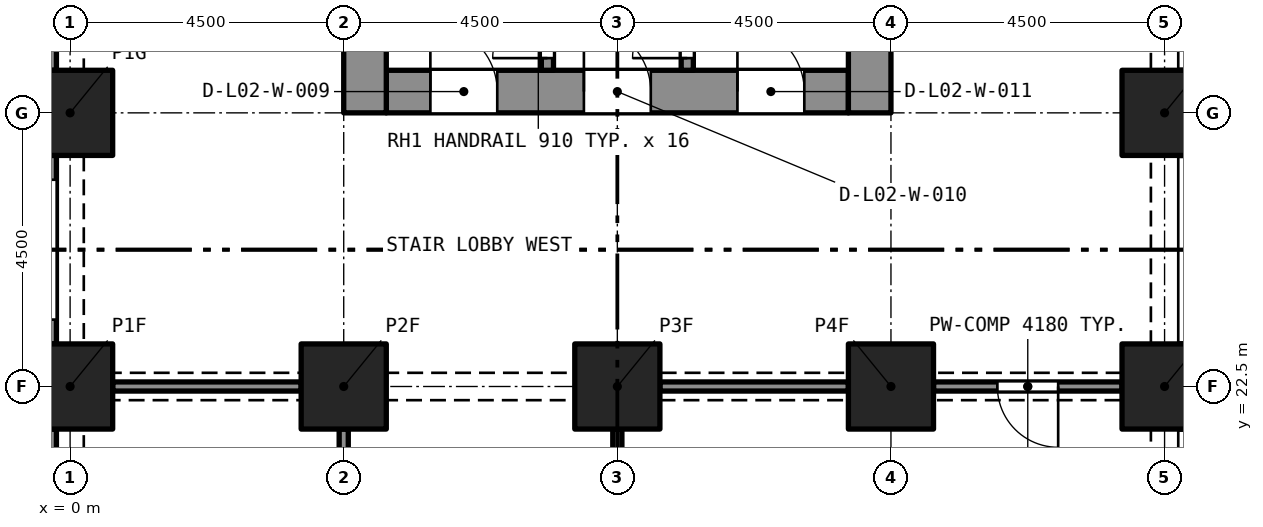
"""IFC4 building model, lengths in metres.
Left out: names, types, materials, properties, quantities, classifications, styles, units other than length and angle.
Written with IfcOpenShell. Run it as: python <this file> out.ifc"""

import sys

from ifc_helpers import new_model, si_unit, direction, frame, frame_2d, origin, origin_2d, place, context, subcontext, project, spatial, rectangle, extrude, element, fill, save


model = new_model("IFC4")
c1 = context("Model", 3, precision=1e-05, world=origin(), true_north=direction((0.0, 1.0)))
c2 = subcontext(c1, "Body", "Model", "MODEL_VIEW")
j1 = project(units=[si_unit("LENGTHUNIT", "METRE"), si_unit("PLANEANGLEUNIT", "RADIAN")], contexts=[c1])
p1 = place(None, origin())
s1 = spatial("IfcSite", under=j1, at=p1, CompositionType="ELEMENT")
p2 = place(p1, origin())
s2 = spatial("IfcBuilding", under=s1, at=p2, CompositionType="ELEMENT")
p3 = place(p2, frame((0.0, 0.0, 11.0)))
s3 = spatial("IfcBuildingStorey", under=s2, at=p3, CompositionType="ELEMENT", Elevation=11.0)
for number, where, z_axis, x_axis in (
    (1, (0.0, 22.5, 0.0), (0.0, 0.0, 1.0), (1.0, 0.0, 0.0)),
    (2, (4.5, 22.5, 0.0), (0.0, 0.0, 1.0), (1.0, 0.0, 0.0)),
    (3, (9.0, 22.5, 0.0), (0.0, 0.0, 1.0), (1.0, 0.0, 0.0)),
    (4, (13.5, 22.5, 0.0), (0.0, 0.0, 1.0), (1.0, 0.0, 0.0)),
    (5, (18.0, 22.5, 0.0), (0.0, 0.0, 1.0), (1.0, 0.0, 0.0)),
    (6, (0.0, 27.0, 0.0), (0.0, 0.0, 1.0), (1.0, 0.0, 0.0)),
    (7, (18.0, 27.0, 0.0), (0.0, 0.0, 1.0), (1.0, 0.0, 0.0)),
):
    element("IfcColumn", number, at=place(p3, frame(where, z_axis=z_axis, x_axis=x_axis)), inside=s3, PredefinedType="COLUMN", context=c2, shape_type="SweptSolid", body=[
        extrude(rectangle(XDim=1.4, YDim=1.4, at=origin_2d()), origin(), (0.0, 0.0, 1.0), 5.0),
    ])
p4 = place(p3, frame((5.2, 27.35, 0.0), z_axis=(0.0, 0.0, 1.0), x_axis=(1.0, 0.0, 0.0)))
e8 = element("IfcWall", 8, at=p4, inside=s3, PredefinedType="SOLIDWALL", context=c2, shape_type="SweptSolid", body=[
    extrude(rectangle(XDim=7.6, YDim=0.7, at=frame_2d((3.8, 0.0))), origin(), (0.0, 0.0, 1.0), 5.0),
])
p5 = place(p4, frame((0.725, 0.0, 0.0)))
e9 = element("IfcOpeningElement", 9, at=p5, cuts=e8, PredefinedType="OPENING", context=c2, shape_type="SweptSolid", body=[
    extrude(rectangle(XDim=1.1, YDim=2.1, at=frame_2d((0.55, 1.05))), frame((0.0, 0.36, 0.0), z_axis=(0.0, -1.0, 0.0), x_axis=(1.0, 0.0, 0.0)), (0.0, 0.0, 1.0), 0.72),
])
p6 = place(p4, frame((3.25, 0.0, 0.0)))
e10 = element("IfcOpeningElement", 10, at=p6, cuts=e8, PredefinedType="OPENING", context=c2, shape_type="SweptSolid", body=[
    extrude(rectangle(XDim=1.1, YDim=2.1, at=frame_2d((0.55, 1.05))), frame((0.0, 0.36, 0.0), z_axis=(0.0, -1.0, 0.0), x_axis=(1.0, 0.0, 0.0)), (0.0, 0.0, 1.0), 0.72),
])
p7 = place(p4, frame((5.775, 0.0, 0.0)))
e11 = element("IfcOpeningElement", 11, at=p7, cuts=e8, PredefinedType="OPENING", context=c2, shape_type="SweptSolid", body=[
    extrude(rectangle(XDim=1.1, YDim=2.1, at=frame_2d((0.55, 1.05))), frame((0.0, 0.36, 0.0), z_axis=(0.0, -1.0, 0.0), x_axis=(1.0, 0.0, 0.0)), (0.0, 0.0, 1.0), 0.72),
])
p8 = place(p3, frame((4.85, 27.0, 0.0), z_axis=(0.0, 0.0, 1.0), x_axis=(0.0, 1.0, 0.0)))
e12 = element("IfcWall", 12, at=p8, inside=s3, PredefinedType="SOLIDWALL", context=c2, shape_type="SweptSolid", body=[
    extrude(rectangle(XDim=13.5, YDim=0.7, at=frame_2d((6.75, 0.0))), origin(), (0.0, 0.0, 1.0), 5.0),
])
p9 = place(p8, frame((8.95, 0.0, 0.0)))
e13 = element("IfcOpeningElement", 13, at=p9, cuts=e12, PredefinedType="OPENING", context=c2, shape_type="SweptSolid", body=[
    extrude(rectangle(XDim=1.2, YDim=2.1, at=frame_2d((0.6, 1.05))), frame((0.0, 0.36, 0.0), z_axis=(0.0, -1.0, 0.0), x_axis=(1.0, 0.0, 0.0)), (0.0, 0.0, 1.0), 0.72),
])
p10 = place(p3, frame((13.15, 27.0, 0.0), z_axis=(0.0, 0.0, 1.0), x_axis=(0.0, 1.0, 0.0)))
e14 = element("IfcWall", 14, at=p10, inside=s3, PredefinedType="SOLIDWALL", context=c2, shape_type="SweptSolid", body=[
    extrude(rectangle(XDim=13.5, YDim=0.7, at=frame_2d((6.75, 0.0))), origin(), (0.0, 0.0, 1.0), 5.0),
])
p11 = place(p10, frame((11.1, 0.0, 0.0)))
e15 = element("IfcOpeningElement", 15, at=p11, cuts=e14, PredefinedType="OPENING", context=c2, shape_type="SweptSolid", body=[
    extrude(rectangle(XDim=1.1, YDim=2.1, at=frame_2d((0.55, 1.05))), frame((0.0, 0.36, 0.0), z_axis=(0.0, -1.0, 0.0), x_axis=(1.0, 0.0, 0.0)), (0.0, 0.0, 1.0), 0.72),
])
p12 = place(p10, frame((8.95, 0.0, 0.0)))
e16 = element("IfcOpeningElement", 16, at=p12, cuts=e14, PredefinedType="OPENING", context=c2, shape_type="SweptSolid", body=[
    extrude(rectangle(XDim=1.2, YDim=2.1, at=frame_2d((0.6, 1.05))), frame((0.0, 0.36, 0.0), z_axis=(0.0, -1.0, 0.0), x_axis=(1.0, 0.0, 0.0)), (0.0, 0.0, 1.0), 0.72),
])
p13 = place(p3, frame((-0.375, 27.7, 0.0), z_axis=(0.0, 0.0, 1.0), x_axis=(0.0, 1.0, 0.0)))
e17 = element("IfcWall", 17, at=p13, inside=s3, PredefinedType="SOLIDWALL", context=c2, shape_type="SweptSolid", body=[
    extrude(rectangle(XDim=3.1, YDim=0.3, at=frame_2d((1.55, 0.0))), origin(), (0.0, 0.0, 1.0), 5.0),
])
p14 = place(p13, frame((0.4, 0.0, 0.45)))
e18 = element("IfcOpeningElement", 18, at=p14, cuts=e17, PredefinedType="OPENING", context=c2, shape_type="SweptSolid", body=[
    extrude(rectangle(XDim=2.3, YDim=3.3, at=frame_2d((1.15, 1.65))), frame((0.0, 0.16, 0.0), z_axis=(0.0, -1.0, 0.0), x_axis=(1.0, 0.0, 0.0)), (0.0, 0.0, 1.0), 0.32),
])
p15 = place(p3, frame((-0.375, 23.2, 0.0), z_axis=(0.0, 0.0, 1.0), x_axis=(0.0, 1.0, 0.0)))
e19 = element("IfcWall", 19, at=p15, inside=s3, PredefinedType="SOLIDWALL", context=c2, shape_type="SweptSolid", body=[
    extrude(rectangle(XDim=3.1, YDim=0.3, at=frame_2d((1.55, 0.0))), origin(), (0.0, 0.0, 1.0), 5.0),
])
p16 = place(p15, frame((0.4, 0.0, 0.45)))
e20 = element("IfcOpeningElement", 20, at=p16, cuts=e19, PredefinedType="OPENING", context=c2, shape_type="SweptSolid", body=[
    extrude(rectangle(XDim=2.3, YDim=3.3, at=frame_2d((1.15, 1.65))), frame((0.0, 0.16, 0.0), z_axis=(0.0, -1.0, 0.0), x_axis=(1.0, 0.0, 0.0)), (0.0, 0.0, 1.0), 0.32),
])
p17 = place(p3, frame((-0.375, 18.7, 0.0), z_axis=(0.0, 0.0, 1.0), x_axis=(0.0, 1.0, 0.0)))
e21 = element("IfcWall", 21, at=p17, inside=s3, PredefinedType="SOLIDWALL", context=c2, shape_type="SweptSolid", body=[
    extrude(rectangle(XDim=3.1, YDim=0.3, at=frame_2d((1.55, 0.0))), origin(), (0.0, 0.0, 1.0), 5.0),
])
p18 = place(p17, frame((0.4, 0.0, 0.45)))
e22 = element("IfcOpeningElement", 22, at=p18, cuts=e21, PredefinedType="OPENING", context=c2, shape_type="SweptSolid", body=[
    extrude(rectangle(XDim=2.3, YDim=3.3, at=frame_2d((1.15, 1.65))), frame((0.0, 0.16, 0.0), z_axis=(0.0, -1.0, 0.0), x_axis=(1.0, 0.0, 0.0)), (0.0, 0.0, 1.0), 0.32),
])
p19 = place(p3, frame((7.85, 27.7, 0.0), z_axis=(0.0, 0.0, 1.0), x_axis=(0.0, 1.0, 0.0)))
e23 = element("IfcWall", 23, at=p19, inside=s3, PredefinedType="SOLIDWALL", context=c2, shape_type="SweptSolid", body=[
    extrude(rectangle(XDim=5.4, YDim=0.2, at=frame_2d((2.7, 0.0))), origin(), (0.0, 0.0, 1.0), 4.65),
])
p20 = place(p19, frame((0.2, 0.0, 0.0)))
e24 = element("IfcOpeningElement", 24, at=p20, cuts=e23, PredefinedType="OPENING", context=c2, shape_type="SweptSolid", body=[
    extrude(rectangle(XDim=0.9, YDim=2.1, at=frame_2d((0.45, 1.05))), frame((0.0, 0.11, 0.0), z_axis=(0.0, -1.0, 0.0), x_axis=(1.0, 0.0, 0.0)), (0.0, 0.0, 1.0), 0.22),
])
p21 = place(p3, frame((10.15, 27.7, 0.0), z_axis=(0.0, 0.0, 1.0), x_axis=(0.0, 1.0, 0.0)))
e25 = element("IfcWall", 25, at=p21, inside=s3, PredefinedType="SOLIDWALL", context=c2, shape_type="SweptSolid", body=[
    extrude(rectangle(XDim=5.4, YDim=0.2, at=frame_2d((2.7, 0.0))), origin(), (0.0, 0.0, 1.0), 4.65),
])
p22 = place(p21, frame((0.2, 0.0, 0.0)))
e26 = element("IfcOpeningElement", 26, at=p22, cuts=e25, PredefinedType="OPENING", context=c2, shape_type="SweptSolid", body=[
    extrude(rectangle(XDim=0.9, YDim=2.1, at=frame_2d((0.45, 1.05))), frame((0.0, 0.11, 0.0), z_axis=(0.0, -1.0, 0.0), x_axis=(1.0, 0.0, 0.0)), (0.0, 0.0, 1.0), 0.22),
])
p23 = place(p3, frame((17.3, 22.5, 0.0), z_axis=(0.0, 0.0, 1.0), x_axis=(-1.0, 0.0, 0.0)))
e27 = element("IfcWall", 27, at=p23, inside=s3, PredefinedType="PARTITIONING", context=c2, shape_type="SweptSolid", body=[
    extrude(rectangle(XDim=3.1, YDim=0.15, at=frame_2d((1.55, 0.0))), origin(), (0.0, 0.0, 1.0), 4.18),
])
p24 = place(p23, frame((1.05, 0.0, 0.0)))
e28 = element("IfcOpeningElement", 28, at=p24, cuts=e27, PredefinedType="OPENING", context=c2, shape_type="SweptSolid", body=[
    extrude(rectangle(XDim=1.0, YDim=2.1, at=frame_2d((0.5, 1.05))), frame((0.0, 0.085, 0.0), z_axis=(0.0, -1.0, 0.0), x_axis=(1.0, 0.0, 0.0)), (0.0, 0.0, 1.0), 0.17),
])
for number, where, z_axis, x_axis in (
    (29, (9.7, 22.5, 0.0), (0.0, 0.0, 1.0), (1.0, 0.0, 0.0)),
    (30, (0.7, 22.5, 0.0), (0.0, 0.0, 1.0), (1.0, 0.0, 0.0)),
):
    element("IfcWall", number, at=place(p3, frame(where, z_axis=z_axis, x_axis=x_axis)), inside=s3, PredefinedType="PARTITIONING", context=c2, shape_type="SweptSolid", body=[
        extrude(rectangle(XDim=3.1, YDim=0.15, at=frame_2d((1.55, 0.0))), origin(), (0.0, 0.0, 1.0), 4.18),
    ])
p25 = place(p3, frame((9.0, 21.8, 0.0), z_axis=(0.0, 0.0, 1.0), x_axis=(0.0, -1.0, 0.0)))
e31 = element("IfcWall", 31, at=p25, inside=s3, PredefinedType="PARTITIONING", context=c2, shape_type="SweptSolid", body=[
    extrude(rectangle(XDim=8.3, YDim=0.15, at=frame_2d((4.15, 0.0))), origin(), (0.0, 0.0, 1.0), 4.65),
])
p26 = place(p25, frame((3.55, 0.0, 0.0)))
e32 = element("IfcOpeningElement", 32, at=p26, cuts=e31, PredefinedType="OPENING", context=c2, shape_type="SweptSolid", body=[
    extrude(rectangle(XDim=1.2, YDim=2.1, at=frame_2d((0.6, 1.05))), frame((0.0, 0.085, 0.0), z_axis=(0.0, -1.0, 0.0), x_axis=(1.0, 0.0, 0.0)), (0.0, 0.0, 1.0), 0.17),
])
p27 = place(p3, frame((4.5, 13.5, 0.0), z_axis=(0.0, 0.0, 1.0), x_axis=(0.0, 1.0, 0.0)))
e33 = element("IfcWall", 33, at=p27, inside=s3, PredefinedType="PARTITIONING", context=c2, shape_type="SweptSolid", body=[
    extrude(rectangle(XDim=8.3, YDim=0.15, at=frame_2d((4.15, 0.0))), origin(), (0.0, 0.0, 1.0), 4.65),
])
p28 = place(p27, frame((3.65, 0.0, 0.0)))
e34 = element("IfcOpeningElement", 34, at=p28, cuts=e33, PredefinedType="OPENING", context=c2, shape_type="SweptSolid", body=[
    extrude(rectangle(XDim=1.0, YDim=2.1, at=frame_2d((0.5, 1.05))), frame((0.0, 0.085, 0.0), z_axis=(0.0, -1.0, 0.0), x_axis=(1.0, 0.0, 0.0)), (0.0, 0.0, 1.0), 0.17),
])
p29 = place(p20, origin())
e35 = element("IfcDoor", 35, at=p29, inside=s3, OperationType="SINGLE_SWING_LEFT", PredefinedType="DOOR", context=c2, shape_type="SweptSolid", body=[
    extrude(rectangle(XDim=0.9, YDim=2.1, at=frame_2d((0.45, 1.05))), frame((0.0, 0.025, 0.0), z_axis=(0.0, -1.0, 0.0), x_axis=(1.0, 0.0, 0.0)), (0.0, 0.0, 1.0), 0.05),
])
fill(e24, e35)
p30 = place(p22, origin())
e36 = element("IfcDoor", 36, at=p30, inside=s3, OperationType="SINGLE_SWING_LEFT", PredefinedType="DOOR", context=c2, shape_type="SweptSolid", body=[
    extrude(rectangle(XDim=0.9, YDim=2.1, at=frame_2d((0.45, 1.05))), frame((0.0, 0.025, 0.0), z_axis=(0.0, -1.0, 0.0), x_axis=(1.0, 0.0, 0.0)), (0.0, 0.0, 1.0), 0.05),
])
fill(e26, e36)
p31 = place(p5, origin())
e37 = element("IfcDoor", 37, at=p31, inside=s3, OperationType="SINGLE_SWING_LEFT", PredefinedType="DOOR", context=c2, shape_type="SweptSolid", body=[
    extrude(rectangle(XDim=1.1, YDim=2.1, at=frame_2d((0.55, 1.05))), frame((0.0, 0.025, 0.0), z_axis=(0.0, -1.0, 0.0), x_axis=(1.0, 0.0, 0.0)), (0.0, 0.0, 1.0), 0.05),
])
fill(e9, e37)
p32 = place(p6, origin())
e38 = element("IfcDoor", 38, at=p32, inside=s3, OperationType="SINGLE_SWING_LEFT", PredefinedType="DOOR", context=c2, shape_type="SweptSolid", body=[
    extrude(rectangle(XDim=1.1, YDim=2.1, at=frame_2d((0.55, 1.05))), frame((0.0, 0.025, 0.0), z_axis=(0.0, -1.0, 0.0), x_axis=(1.0, 0.0, 0.0)), (0.0, 0.0, 1.0), 0.05),
])
fill(e10, e38)
p33 = place(p7, origin())
e39 = element("IfcDoor", 39, at=p33, inside=s3, OperationType="SINGLE_SWING_LEFT", PredefinedType="DOOR", context=c2, shape_type="SweptSolid", body=[
    extrude(rectangle(XDim=1.1, YDim=2.1, at=frame_2d((0.55, 1.05))), frame((0.0, 0.025, 0.0), z_axis=(0.0, -1.0, 0.0), x_axis=(1.0, 0.0, 0.0)), (0.0, 0.0, 1.0), 0.05),
])
fill(e11, e39)
p34 = place(p24, origin())
e40 = element("IfcDoor", 40, at=p34, inside=s3, OperationType="SINGLE_SWING_RIGHT", PredefinedType="DOOR", context=c2, shape_type="SweptSolid", body=[
    extrude(rectangle(XDim=1.0, YDim=2.1, at=frame_2d((0.5, 1.05))), frame((0.0, 0.025, 0.0), z_axis=(0.0, -1.0, 0.0), x_axis=(1.0, 0.0, 0.0)), (0.0, 0.0, 1.0), 0.05),
])
fill(e28, e40)
save(model, sys.argv[1])
